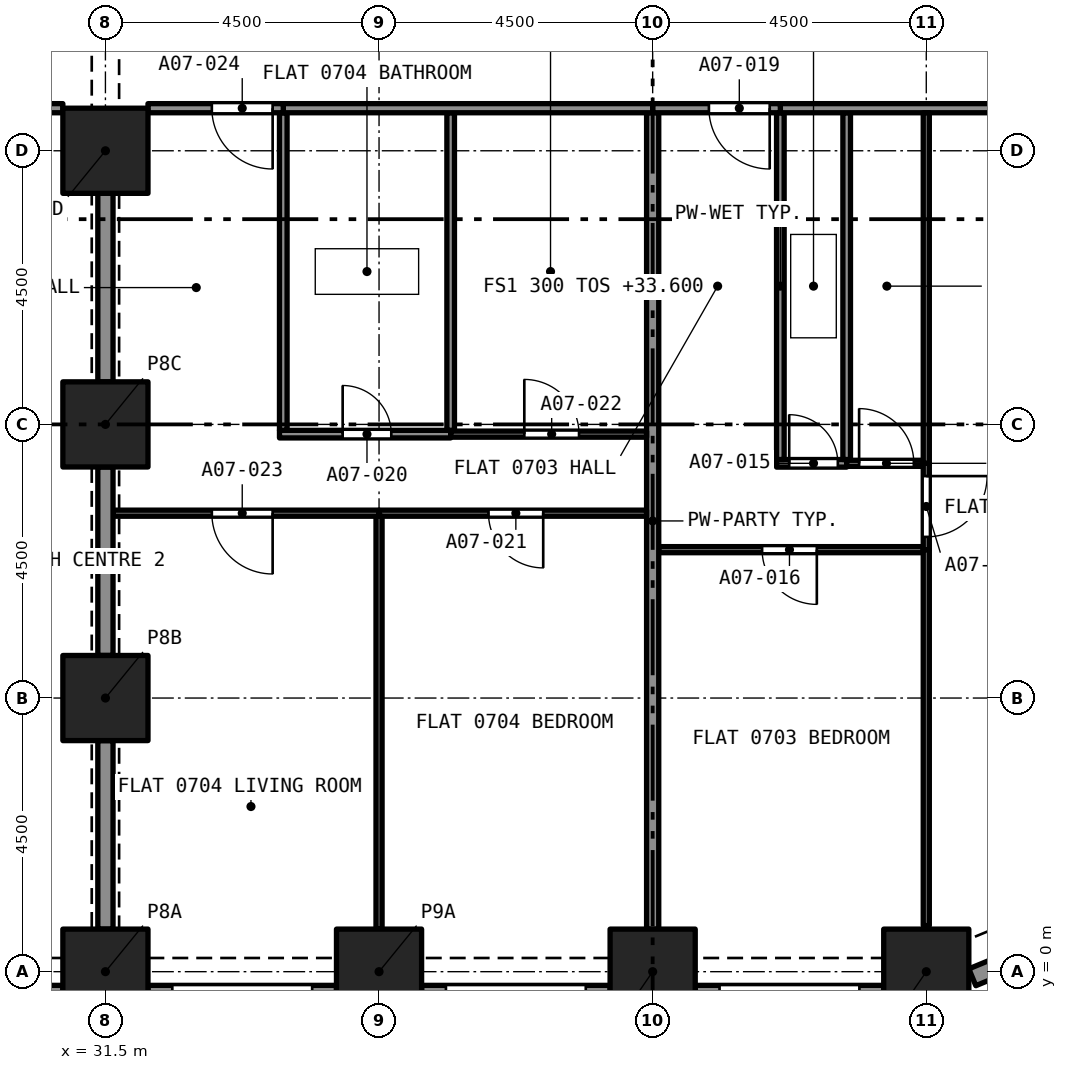
"""IFC4 building model, lengths in metres.
Left out: names, types, materials, properties, quantities, classifications, styles, units other than length and angle.
Written with IfcOpenShell. Run it as: python <this file> out.ifc"""

import sys

from ifc_helpers import new_model, si_unit, direction, frame, frame_2d, origin, origin_2d, place, context, subcontext, project, spatial, rectangle, extrude, element, fill, save


model = new_model("IFC4")
c1 = context("Model", 3, precision=1e-05, world=origin(), true_north=direction((0.0, 1.0)))
c2 = subcontext(c1, "Body", "Model", "MODEL_VIEW")
j1 = project(units=[si_unit("LENGTHUNIT", "METRE"), si_unit("PLANEANGLEUNIT", "RADIAN")], contexts=[c1])
p1 = place(None, origin())
s1 = spatial("IfcSite", under=j1, at=p1, CompositionType="ELEMENT")
p2 = place(p1, origin())
s2 = spatial("IfcBuilding", under=s1, at=p2, CompositionType="ELEMENT")
p3 = place(p2, frame((0.0, 0.0, 33.6)))
s3 = spatial("IfcBuildingStorey", under=s2, at=p3, CompositionType="ELEMENT", Elevation=33.6)
for number, where, z_axis, x_axis in (
    (1, (31.5, 0.0, 0.0), (0.0, 0.0, 1.0), (1.0, 0.0, 0.0)),
    (2, (36.0, 0.0, 0.0), (0.0, 0.0, 1.0), (1.0, 0.0, 0.0)),
    (3, (40.5, 0.0, 0.0), (0.0, 0.0, 1.0), (1.0, 0.0, 0.0)),
    (4, (45.0, 0.0, 0.0), (0.0, 0.0, 1.0), (1.0, 0.0, 0.0)),
    (5, (31.5, 4.5, 0.0), (0.0, 0.0, 1.0), (1.0, 0.0, 0.0)),
    (6, (31.5, 9.0, 0.0), (0.0, 0.0, 1.0), (1.0, 0.0, 0.0)),
    (7, (31.5, 13.5, 0.0), (0.0, 0.0, 1.0), (1.0, 0.0, 0.0)),
):
    element("IfcColumn", number, at=place(p3, frame(where, z_axis=z_axis, x_axis=x_axis)), inside=s3, PredefinedType="COLUMN", context=c2, shape_type="SweptSolid", body=[
        extrude(rectangle(XDim=1.4, YDim=1.4, at=origin_2d()), origin(), (0.0, 0.0, 1.0), 3.2),
    ])
p4 = place(p3, frame((30.8, -0.375, 0.0), z_axis=(0.0, 0.0, 1.0), x_axis=(-1.0, 0.0, 0.0)))
e8 = element("IfcWall", 8, at=p4, inside=s3, PredefinedType="SOLIDWALL", context=c2, shape_type="SweptSolid", body=[
    extrude(rectangle(XDim=3.1, YDim=0.3, at=frame_2d((1.55, 0.0))), origin(), (0.0, 0.0, 1.0), 3.2),
])
p5 = place(p4, frame((0.4, 0.0, 0.45)))
e9 = element("IfcOpeningElement", 9, at=p5, cuts=e8, PredefinedType="OPENING", context=c2, shape_type="SweptSolid", body=[
    extrude(rectangle(XDim=2.3, YDim=1.95, at=frame_2d((1.15, 0.975))), frame((0.0, 0.16, 0.0), z_axis=(0.0, -1.0, 0.0), x_axis=(1.0, 0.0, 0.0)), (0.0, 0.0, 1.0), 0.32),
])
p6 = place(p3, frame((35.3, -0.375, 0.0), z_axis=(0.0, 0.0, 1.0), x_axis=(-1.0, 0.0, 0.0)))
e10 = element("IfcWall", 10, at=p6, inside=s3, PredefinedType="SOLIDWALL", context=c2, shape_type="SweptSolid", body=[
    extrude(rectangle(XDim=3.1, YDim=0.3, at=frame_2d((1.55, 0.0))), origin(), (0.0, 0.0, 1.0), 3.2),
])
p7 = place(p6, frame((0.4, 0.0, 0.45)))
e11 = element("IfcOpeningElement", 11, at=p7, cuts=e10, PredefinedType="OPENING", context=c2, shape_type="SweptSolid", body=[
    extrude(rectangle(XDim=2.3, YDim=1.95, at=frame_2d((1.15, 0.975))), frame((0.0, 0.16, 0.0), z_axis=(0.0, -1.0, 0.0), x_axis=(1.0, 0.0, 0.0)), (0.0, 0.0, 1.0), 0.32),
])
p8 = place(p3, frame((39.8, -0.375, 0.0), z_axis=(0.0, 0.0, 1.0), x_axis=(-1.0, 0.0, 0.0)))
e12 = element("IfcWall", 12, at=p8, inside=s3, PredefinedType="SOLIDWALL", context=c2, shape_type="SweptSolid", body=[
    extrude(rectangle(XDim=3.1, YDim=0.3, at=frame_2d((1.55, 0.0))), origin(), (0.0, 0.0, 1.0), 3.2),
])
p9 = place(p8, frame((0.4, 0.0, 0.45)))
e13 = element("IfcOpeningElement", 13, at=p9, cuts=e12, PredefinedType="OPENING", context=c2, shape_type="SweptSolid", body=[
    extrude(rectangle(XDim=2.3, YDim=1.95, at=frame_2d((1.15, 0.975))), frame((0.0, 0.16, 0.0), z_axis=(0.0, -1.0, 0.0), x_axis=(1.0, 0.0, 0.0)), (0.0, 0.0, 1.0), 0.32),
])
p10 = place(p3, frame((44.3, -0.375, 0.0), z_axis=(0.0, 0.0, 1.0), x_axis=(-1.0, 0.0, 0.0)))
e14 = element("IfcWall", 14, at=p10, inside=s3, PredefinedType="SOLIDWALL", context=c2, shape_type="SweptSolid", body=[
    extrude(rectangle(XDim=3.1, YDim=0.3, at=frame_2d((1.55, 0.0))), origin(), (0.0, 0.0, 1.0), 3.2),
])
p11 = place(p10, frame((0.4, 0.0, 0.45)))
e15 = element("IfcOpeningElement", 15, at=p11, cuts=e14, PredefinedType="OPENING", context=c2, shape_type="SweptSolid", body=[
    extrude(rectangle(XDim=2.3, YDim=1.95, at=frame_2d((1.15, 0.975))), frame((0.0, 0.16, 0.0), z_axis=(0.0, -1.0, 0.0), x_axis=(1.0, 0.0, 0.0)), (0.0, 0.0, 1.0), 0.32),
])
p12 = place(p3, frame((47.48, 0.622, 0.0), z_axis=(0.0, 0.0, 1.0), x_axis=(-0.923903565336, -0.38262540684, 0.0)))
e16 = element("IfcWall", 16, at=p12, inside=s3, PredefinedType="SOLIDWALL", context=c2, shape_type="SweptSolid", body=[
    extrude(rectangle(XDim=1.865, YDim=0.3, at=frame_2d((0.933, 0.0))), origin(), (0.0, 0.0, 1.0), 3.2),
])
p13 = place(p12, frame((0.258, 0.0, 0.45)))
e17 = element("IfcOpeningElement", 17, at=p13, cuts=e16, PredefinedType="OPENING", context=c2, shape_type="SweptSolid", body=[
    extrude(rectangle(XDim=1.1, YDim=1.95, at=frame_2d((0.55, 0.975))), frame((0.0, 0.16, 0.0), z_axis=(0.0, -1.0, 0.0), x_axis=(1.0, 0.0, 0.0)), (0.0, 0.0, 1.0), 0.32),
])
p14 = place(p3, frame((42.538, 8.36, 0.0), z_axis=(0.0, 0.0, 1.0), x_axis=(1.0, 0.0, 0.0)))
e18 = element("IfcWall", 18, at=p14, inside=s3, PredefinedType="PARTITIONING", context=c2, shape_type="SweptSolid", body=[
    extrude(rectangle(XDim=1.153, YDim=0.125, at=frame_2d((0.577, 0.0))), origin(), (0.0, 0.0, 1.0), 2.9),
])
p15 = place(p14, frame((0.208, 0.0, 0.0)))
e19 = element("IfcOpeningElement", 19, at=p15, cuts=e18, PredefinedType="OPENING", context=c2, shape_type="SweptSolid", body=[
    extrude(rectangle(XDim=0.8, YDim=2.1, at=frame_2d((0.4, 1.05))), frame((0.0, 0.073, 0.0), z_axis=(0.0, -1.0, 0.0), x_axis=(1.0, 0.0, 0.0)), (0.0, 0.0, 1.0), 0.145),
])
for number, where, z_axis, x_axis in (
    (20, (42.6, 8.423, 0.0), (0.0, 0.0, 1.0), (0.0, 1.0, 0.0)),
    (21, (43.691, 8.423, 0.0), (0.0, 0.0, 1.0), (0.0, 1.0, 0.0)),
):
    element("IfcWall", number, at=place(p3, frame(where, z_axis=z_axis, x_axis=x_axis)), inside=s3, PredefinedType="PARTITIONING", context=c2, shape_type="SweptSolid", body=[
        extrude(rectangle(XDim=5.702, YDim=0.125, at=frame_2d((2.851, 0.0))), origin(), (0.0, 0.0, 1.0), 2.9),
    ])
p16 = place(p3, frame((42.6, 14.2, 0.0), z_axis=(0.0, 0.0, 1.0), x_axis=(1.0, 0.0, 0.0)))
e22 = element("IfcWall", 22, at=p16, inside=s3, PredefinedType="PARTITIONING", context=c2, shape_type="SweptSolid", body=[
    extrude(rectangle(XDim=6.2, YDim=0.15, at=frame_2d((3.1, 0.0))), origin(), (0.0, 0.0, 1.0), 2.9),
])
p17 = place(p3, frame((44.95, 6.94, 0.0), z_axis=(0.0, 0.0, 1.0), x_axis=(-1.0, 0.0, 0.0)))
e23 = element("IfcWall", 23, at=p17, inside=s3, PredefinedType="PARTITIONING", context=c2, shape_type="SweptSolid", body=[
    extrude(rectangle(XDim=4.35, YDim=0.1, at=frame_2d((2.175, 0.0))), origin(), (0.0, 0.0, 1.0), 2.9),
])
p18 = place(p17, frame((1.75, 0.0, 0.0)))
e24 = element("IfcOpeningElement", 24, at=p18, cuts=e23, PredefinedType="OPENING", context=c2, shape_type="SweptSolid", body=[
    extrude(rectangle(XDim=0.9, YDim=2.1, at=frame_2d((0.45, 1.05))), frame((0.0, 0.06, 0.0), z_axis=(0.0, -1.0, 0.0), x_axis=(1.0, 0.0, 0.0)), (0.0, 0.0, 1.0), 0.12),
])
p19 = place(p3, frame((45.0, 0.758, 0.0), z_axis=(0.0, 0.0, 1.0), x_axis=(0.0, 1.0, 0.0)))
e25 = element("IfcWall", 25, at=p19, inside=s3, PredefinedType="PARTITIONING", context=c2, shape_type="SweptSolid", body=[
    extrude(rectangle(XDim=6.182, YDim=0.1, at=frame_2d((3.091, 0.0))), origin(), (0.0, 0.0, 1.0), 2.9),
])
p20 = place(p3, frame((40.5, 0.7, 0.0), z_axis=(0.0, 0.0, 1.0), x_axis=(0.0, 1.0, 0.0)))
e26 = element("IfcWall", 26, at=p20, inside=s3, PredefinedType="PARTITIONING", context=c2, shape_type="SweptSolid", body=[
    extrude(rectangle(XDim=13.425, YDim=0.2, at=frame_2d((6.712, 0.0))), origin(), (0.0, 0.0, 1.0), 2.9),
])
p21 = place(p3, frame((43.691, 8.36, 0.0), z_axis=(0.0, 0.0, 1.0), x_axis=(1.0, 0.0, 0.0)))
e27 = element("IfcWall", 27, at=p21, inside=s3, PredefinedType="PARTITIONING", context=c2, shape_type="SweptSolid", body=[
    extrude(rectangle(XDim=1.259, YDim=0.1, at=frame_2d((0.629, 0.0))), origin(), (0.0, 0.0, 1.0), 2.9),
])
p22 = place(p21, frame((0.205, 0.0, 0.0)))
e28 = element("IfcOpeningElement", 28, at=p22, cuts=e27, PredefinedType="OPENING", context=c2, shape_type="SweptSolid", body=[
    extrude(rectangle(XDim=0.9, YDim=2.1, at=frame_2d((0.45, 1.05))), frame((0.0, 0.06, 0.0), z_axis=(0.0, -1.0, 0.0), x_axis=(1.0, 0.0, 0.0)), (0.0, 0.0, 1.0), 0.12),
])
p23 = place(p3, frame((45.0, 8.36, 0.0), z_axis=(0.0, 0.0, 1.0), x_axis=(0.0, -1.0, 0.0)))
e29 = element("IfcWall", 29, at=p23, inside=s3, PredefinedType="PARTITIONING", context=c2, shape_type="SweptSolid", body=[
    extrude(rectangle(XDim=1.42, YDim=0.1, at=frame_2d((0.71, 0.0))), origin(), (0.0, 0.0, 1.0), 2.9),
])
p24 = place(p23, frame((0.21, 0.0, 0.0)))
e30 = element("IfcOpeningElement", 30, at=p24, cuts=e29, PredefinedType="OPENING", context=c2, shape_type="SweptSolid", body=[
    extrude(rectangle(XDim=1.0, YDim=2.1, at=frame_2d((0.5, 1.05))), frame((0.0, 0.06, 0.0), z_axis=(0.0, -1.0, 0.0), x_axis=(1.0, 0.0, 0.0)), (0.0, 0.0, 1.0), 0.12),
])
p25 = place(p3, frame((42.6, 14.2, 0.0), z_axis=(0.0, 0.0, 1.0), x_axis=(-1.0, 0.0, 0.0)))
e31 = element("IfcWall", 31, at=p25, inside=s3, PredefinedType="PARTITIONING", context=c2, shape_type="SweptSolid", body=[
    extrude(rectangle(XDim=2.1, YDim=0.15, at=frame_2d((1.05, 0.0))), origin(), (0.0, 0.0, 1.0), 2.9),
])
p26 = place(p25, frame((0.175, 0.0, 0.0)))
e32 = element("IfcOpeningElement", 32, at=p26, cuts=e31, PredefinedType="OPENING", context=c2, shape_type="SweptSolid", body=[
    extrude(rectangle(XDim=1.0, YDim=2.1, at=frame_2d((0.5, 1.05))), frame((0.0, 0.085, 0.0), z_axis=(0.0, -1.0, 0.0), x_axis=(1.0, 0.0, 0.0)), (0.0, 0.0, 1.0), 0.17),
])
p27 = place(p3, frame((45.0, 8.36, 0.0), z_axis=(0.0, 0.0, 1.0), x_axis=(0.0, 1.0, 0.0)))
e33 = element("IfcWall", 33, at=p27, inside=s3, PredefinedType="PARTITIONING", context=c2, shape_type="SweptSolid", body=[
    extrude(rectangle(XDim=5.765, YDim=0.1, at=frame_2d((2.882, 0.0))), origin(), (0.0, 0.0, 1.0), 2.9),
])
p28 = place(p3, frame((34.363, 8.84, 0.0), z_axis=(0.0, 0.0, 1.0), x_axis=(1.0, 0.0, 0.0)))
e34 = element("IfcWall", 34, at=p28, inside=s3, PredefinedType="PARTITIONING", context=c2, shape_type="SweptSolid", body=[
    extrude(rectangle(XDim=2.816, YDim=0.125, at=frame_2d((1.408, 0.0))), origin(), (0.0, 0.0, 1.0), 2.9),
])
p29 = place(p28, frame((1.039, 0.0, 0.0)))
e35 = element("IfcOpeningElement", 35, at=p29, cuts=e34, PredefinedType="OPENING", context=c2, shape_type="SweptSolid", body=[
    extrude(rectangle(XDim=0.8, YDim=2.1, at=frame_2d((0.4, 1.05))), frame((0.0, 0.073, 0.0), z_axis=(0.0, -1.0, 0.0), x_axis=(1.0, 0.0, 0.0)), (0.0, 0.0, 1.0), 0.145),
])
for number, where, z_axis, x_axis in (
    (36, (34.425, 8.903, 0.0), (0.0, 0.0, 1.0), (0.0, 1.0, 0.0)),
    (37, (37.178, 8.903, 0.0), (0.0, 0.0, 1.0), (0.0, 1.0, 0.0)),
):
    element("IfcWall", number, at=place(p3, frame(where, z_axis=z_axis, x_axis=x_axis)), inside=s3, PredefinedType="PARTITIONING", context=c2, shape_type="SweptSolid", body=[
        extrude(rectangle(XDim=5.222, YDim=0.125, at=frame_2d((2.611, 0.0))), origin(), (0.0, 0.0, 1.0), 2.9),
    ])
p30 = place(p3, frame((34.425, 14.2, 0.0), z_axis=(0.0, 0.0, 1.0), x_axis=(1.0, 0.0, 0.0)))
e38 = element("IfcWall", 38, at=p30, inside=s3, PredefinedType="PARTITIONING", context=c2, shape_type="SweptSolid", body=[
    extrude(rectangle(XDim=6.075, YDim=0.15, at=frame_2d((3.038, 0.0))), origin(), (0.0, 0.0, 1.0), 2.9),
])
p31 = place(p3, frame((40.4, 7.54, 0.0), z_axis=(0.0, 0.0, 1.0), x_axis=(-1.0, 0.0, 0.0)))
e39 = element("IfcWall", 39, at=p31, inside=s3, PredefinedType="PARTITIONING", context=c2, shape_type="SweptSolid", body=[
    extrude(rectangle(XDim=4.4, YDim=0.1, at=frame_2d((2.2, 0.0))), origin(), (0.0, 0.0, 1.0), 2.9),
])
p32 = place(p31, frame((1.7, 0.0, 0.0)))
e40 = element("IfcOpeningElement", 40, at=p32, cuts=e39, PredefinedType="OPENING", context=c2, shape_type="SweptSolid", body=[
    extrude(rectangle(XDim=0.9, YDim=2.1, at=frame_2d((0.45, 1.05))), frame((0.0, 0.06, 0.0), z_axis=(0.0, -1.0, 0.0), x_axis=(1.0, 0.0, 0.0)), (0.0, 0.0, 1.0), 0.12),
])
p33 = place(p3, frame((36.0, 0.7, 0.0), z_axis=(0.0, 0.0, 1.0), x_axis=(0.0, 1.0, 0.0)))
e41 = element("IfcWall", 41, at=p33, inside=s3, PredefinedType="PARTITIONING", context=c2, shape_type="SweptSolid", body=[
    extrude(rectangle(XDim=6.79, YDim=0.1, at=frame_2d((3.395, 0.0))), origin(), (0.0, 0.0, 1.0), 2.9),
])
p34 = place(p3, frame((37.178, 8.84, 0.0), z_axis=(0.0, 0.0, 1.0), x_axis=(1.0, 0.0, 0.0)))
e42 = element("IfcWall", 42, at=p34, inside=s3, PredefinedType="PARTITIONING", context=c2, shape_type="SweptSolid", body=[
    extrude(rectangle(XDim=3.222, YDim=0.1, at=frame_2d((1.611, 0.0))), origin(), (0.0, 0.0, 1.0), 2.9),
])
p35 = place(p34, frame((1.211, 0.0, 0.0)))
e43 = element("IfcOpeningElement", 43, at=p35, cuts=e42, PredefinedType="OPENING", context=c2, shape_type="SweptSolid", body=[
    extrude(rectangle(XDim=0.9, YDim=2.1, at=frame_2d((0.45, 1.05))), frame((0.0, 0.06, 0.0), z_axis=(0.0, -1.0, 0.0), x_axis=(1.0, 0.0, 0.0)), (0.0, 0.0, 1.0), 0.12),
])
p36 = place(p3, frame((36.0, 7.54, 0.0), z_axis=(0.0, 0.0, 1.0), x_axis=(-1.0, 0.0, 0.0)))
e44 = element("IfcWall", 44, at=p36, inside=s3, PredefinedType="PARTITIONING", context=c2, shape_type="SweptSolid", body=[
    extrude(rectangle(XDim=4.375, YDim=0.1, at=frame_2d((2.188, 0.0))), origin(), (0.0, 0.0, 1.0), 2.9),
])
p37 = place(p36, frame((1.75, 0.0, 0.0)))
e45 = element("IfcOpeningElement", 45, at=p37, cuts=e44, PredefinedType="OPENING", context=c2, shape_type="SweptSolid", body=[
    extrude(rectangle(XDim=1.0, YDim=2.1, at=frame_2d((0.5, 1.05))), frame((0.0, 0.06, 0.0), z_axis=(0.0, -1.0, 0.0), x_axis=(1.0, 0.0, 0.0)), (0.0, 0.0, 1.0), 0.12),
])
p38 = place(p3, frame((31.5, 9.7, 0.0), z_axis=(0.0, 0.0, 1.0), x_axis=(0.0, 1.0, 0.0)))
e46 = element("IfcWall", 46, at=p38, inside=s3, PredefinedType="PARTITIONING", context=c2, shape_type="SweptSolid", body=[
    extrude(rectangle(XDim=3.1, YDim=0.25, at=frame_2d((1.55, 0.0))), origin(), (0.0, 0.0, 1.0), 2.38),
])
p39 = place(p3, frame((34.425, 14.2, 0.0), z_axis=(0.0, 0.0, 1.0), x_axis=(-1.0, 0.0, 0.0)))
e47 = element("IfcWall", 47, at=p39, inside=s3, PredefinedType="PARTITIONING", context=c2, shape_type="SweptSolid", body=[
    extrude(rectangle(XDim=2.225, YDim=0.15, at=frame_2d((1.113, 0.0))), origin(), (0.0, 0.0, 1.0), 2.9),
])
p40 = place(p39, frame((0.175, 0.0, 0.0)))
e48 = element("IfcOpeningElement", 48, at=p40, cuts=e47, PredefinedType="OPENING", context=c2, shape_type="SweptSolid", body=[
    extrude(rectangle(XDim=1.0, YDim=2.1, at=frame_2d((0.5, 1.05))), frame((0.0, 0.085, 0.0), z_axis=(0.0, -1.0, 0.0), x_axis=(1.0, 0.0, 0.0)), (0.0, 0.0, 1.0), 0.17),
])
for number, where, z_axis, x_axis in (
    (49, (31.5, 0.7, 0.0), (0.0, 0.0, 1.0), (0.0, 1.0, 0.0)),
    (50, (31.5, 5.2, 0.0), (0.0, 0.0, 1.0), (0.0, 1.0, 0.0)),
):
    element("IfcWall", number, at=place(p3, frame(where, z_axis=z_axis, x_axis=x_axis)), inside=s3, PredefinedType="PARTITIONING", context=c2, shape_type="SweptSolid", body=[
        extrude(rectangle(XDim=3.1, YDim=0.25, at=frame_2d((1.55, 0.0))), origin(), (0.0, 0.0, 1.0), 2.38),
    ])
p41 = place(p3, frame((30.8, 14.2, 0.0), z_axis=(0.0, 0.0, 1.0), x_axis=(-1.0, 0.0, 0.0)))
e51 = element("IfcWall", 51, at=p41, inside=s3, PredefinedType="PARTITIONING", context=c2, shape_type="SweptSolid", body=[
    extrude(rectangle(XDim=3.8, YDim=0.15, at=frame_2d((1.9, 0.0))), origin(), (0.0, 0.0, 1.0), 2.75),
])
p42 = place(p41, frame((1.05, 0.0, 0.0)))
e52 = element("IfcOpeningElement", 52, at=p42, cuts=e51, PredefinedType="OPENING", context=c2, shape_type="SweptSolid", body=[
    extrude(rectangle(XDim=1.0, YDim=2.1, at=frame_2d((0.5, 1.05))), frame((0.0, 0.085, 0.0), z_axis=(0.0, -1.0, 0.0), x_axis=(1.0, 0.0, 0.0)), (0.0, 0.0, 1.0), 0.17),
])
p43 = place(p15, origin())
e53 = element("IfcDoor", 53, at=p43, inside=s3, OperationType="SINGLE_SWING_RIGHT", PredefinedType="DOOR", context=c2, shape_type="SweptSolid", body=[
    extrude(rectangle(XDim=0.8, YDim=2.1, at=frame_2d((0.4, 1.05))), frame((0.0, 0.025, 0.0), z_axis=(0.0, -1.0, 0.0), x_axis=(1.0, 0.0, 0.0)), (0.0, 0.0, 1.0), 0.05),
])
fill(e19, e53)
p44 = place(p18, origin())
e54 = element("IfcDoor", 54, at=p44, inside=s3, OperationType="SINGLE_SWING_RIGHT", PredefinedType="DOOR", context=c2, shape_type="SweptSolid", body=[
    extrude(rectangle(XDim=0.9, YDim=2.1, at=frame_2d((0.45, 1.05))), frame((0.0, 0.025, 0.0), z_axis=(0.0, -1.0, 0.0), x_axis=(1.0, 0.0, 0.0)), (0.0, 0.0, 1.0), 0.05),
])
fill(e24, e54)
p45 = place(p22, origin())
e55 = element("IfcDoor", 55, at=p45, inside=s3, OperationType="SINGLE_SWING_RIGHT", PredefinedType="DOOR", context=c2, shape_type="SweptSolid", body=[
    extrude(rectangle(XDim=0.9, YDim=2.1, at=frame_2d((0.45, 1.05))), frame((0.0, 0.025, 0.0), z_axis=(0.0, -1.0, 0.0), x_axis=(1.0, 0.0, 0.0)), (0.0, 0.0, 1.0), 0.05),
])
fill(e28, e55)
p46 = place(p24, origin())
e56 = element("IfcDoor", 56, at=p46, inside=s3, OperationType="SINGLE_SWING_LEFT", PredefinedType="DOOR", context=c2, shape_type="SweptSolid", body=[
    extrude(rectangle(XDim=1.0, YDim=2.1, at=frame_2d((0.5, 1.05))), frame((0.0, 0.025, 0.0), z_axis=(0.0, -1.0, 0.0), x_axis=(1.0, 0.0, 0.0)), (0.0, 0.0, 1.0), 0.05),
])
fill(e30, e56)
p47 = place(p26, origin())
e57 = element("IfcDoor", 57, at=p47, inside=s3, OperationType="SINGLE_SWING_LEFT", PredefinedType="DOOR", context=c2, shape_type="SweptSolid", body=[
    extrude(rectangle(XDim=1.0, YDim=2.1, at=frame_2d((0.5, 1.05))), frame((0.0, 0.025, 0.0), z_axis=(0.0, -1.0, 0.0), x_axis=(1.0, 0.0, 0.0)), (0.0, 0.0, 1.0), 0.05),
])
fill(e32, e57)
p48 = place(p29, origin())
e58 = element("IfcDoor", 58, at=p48, inside=s3, OperationType="SINGLE_SWING_RIGHT", PredefinedType="DOOR", context=c2, shape_type="SweptSolid", body=[
    extrude(rectangle(XDim=0.8, YDim=2.1, at=frame_2d((0.4, 1.05))), frame((0.0, 0.025, 0.0), z_axis=(0.0, -1.0, 0.0), x_axis=(1.0, 0.0, 0.0)), (0.0, 0.0, 1.0), 0.05),
])
fill(e35, e58)
p49 = place(p32, origin())
e59 = element("IfcDoor", 59, at=p49, inside=s3, OperationType="SINGLE_SWING_LEFT", PredefinedType="DOOR", context=c2, shape_type="SweptSolid", body=[
    extrude(rectangle(XDim=0.9, YDim=2.1, at=frame_2d((0.45, 1.05))), frame((0.0, 0.025, 0.0), z_axis=(0.0, -1.0, 0.0), x_axis=(1.0, 0.0, 0.0)), (0.0, 0.0, 1.0), 0.05),
])
fill(e40, e59)
p50 = place(p35, origin())
e60 = element("IfcDoor", 60, at=p50, inside=s3, OperationType="SINGLE_SWING_RIGHT", PredefinedType="DOOR", context=c2, shape_type="SweptSolid", body=[
    extrude(rectangle(XDim=0.9, YDim=2.1, at=frame_2d((0.45, 1.05))), frame((0.0, 0.025, 0.0), z_axis=(0.0, -1.0, 0.0), x_axis=(1.0, 0.0, 0.0)), (0.0, 0.0, 1.0), 0.05),
])
fill(e43, e60)
p51 = place(p37, origin())
e61 = element("IfcDoor", 61, at=p51, inside=s3, OperationType="SINGLE_SWING_RIGHT", PredefinedType="DOOR", context=c2, shape_type="SweptSolid", body=[
    extrude(rectangle(XDim=1.0, YDim=2.1, at=frame_2d((0.5, 1.05))), frame((0.0, 0.025, 0.0), z_axis=(0.0, -1.0, 0.0), x_axis=(1.0, 0.0, 0.0)), (0.0, 0.0, 1.0), 0.05),
])
fill(e45, e61)
p52 = place(p40, origin())
e62 = element("IfcDoor", 62, at=p52, inside=s3, OperationType="SINGLE_SWING_LEFT", PredefinedType="DOOR", context=c2, shape_type="SweptSolid", body=[
    extrude(rectangle(XDim=1.0, YDim=2.1, at=frame_2d((0.5, 1.05))), frame((0.0, 0.025, 0.0), z_axis=(0.0, -1.0, 0.0), x_axis=(1.0, 0.0, 0.0)), (0.0, 0.0, 1.0), 0.05),
])
fill(e48, e62)
save(model, sys.argv[1])
